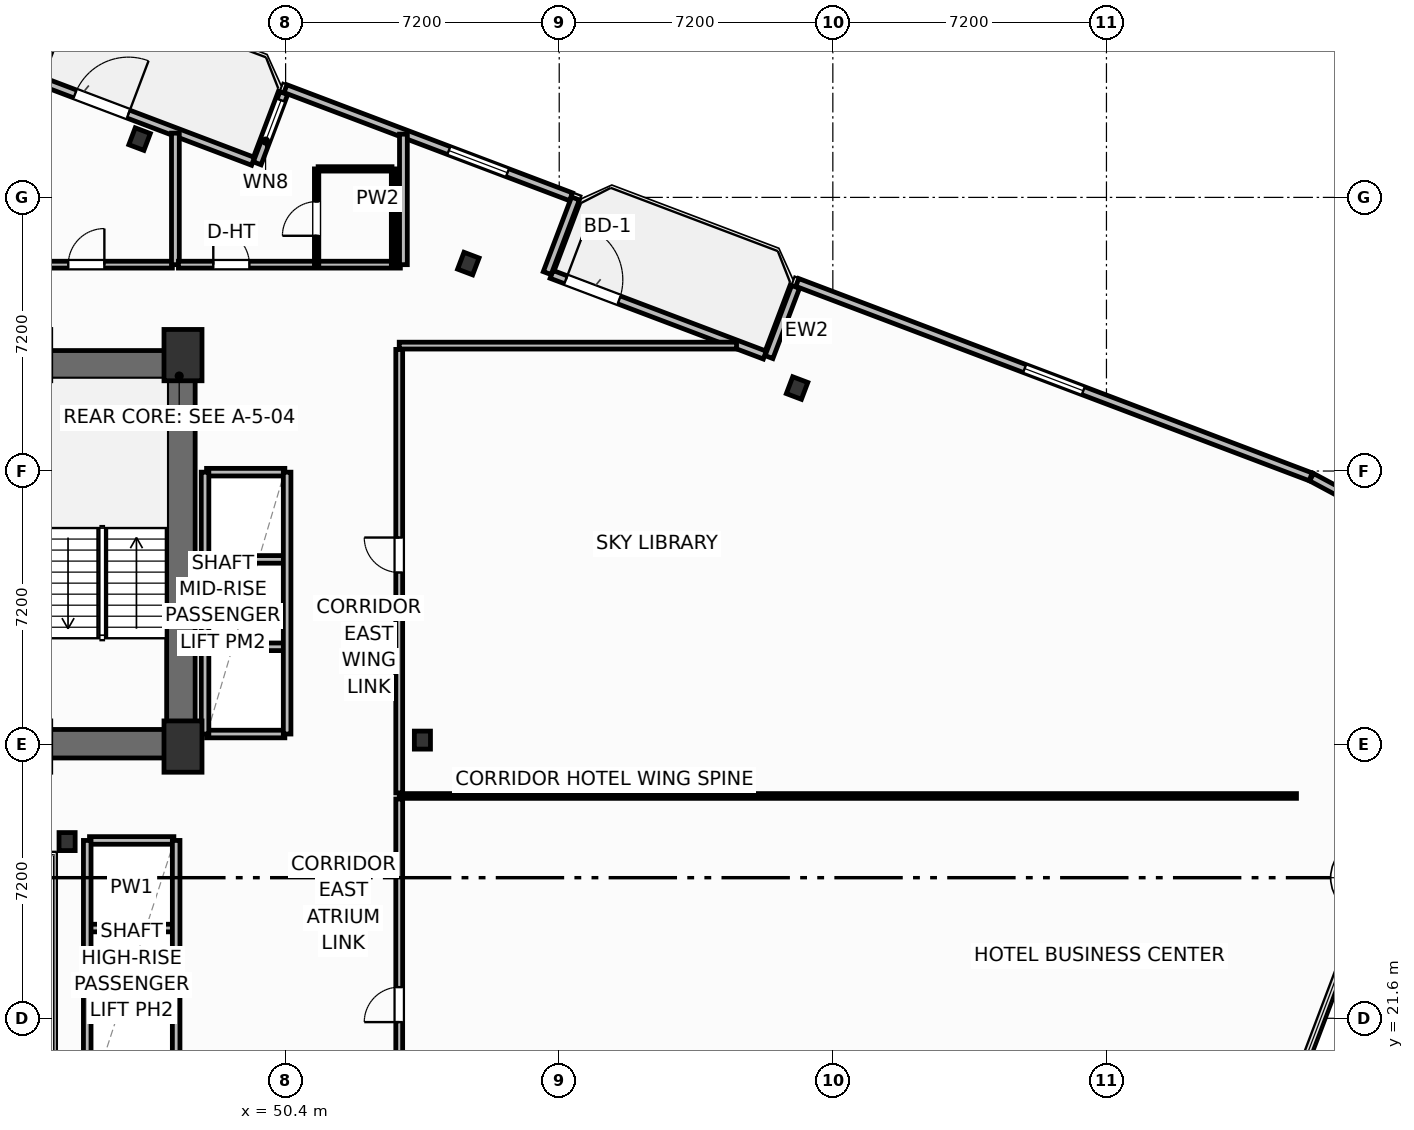
"""IFC4 building model, lengths in metres.
Left out: names, types, materials, properties, quantities, classifications, styles, units other than length and angle.
Written with IfcOpenShell. Run it as: python <this file> out.ifc"""

import sys

from ifc_helpers import new_model, si_unit, direction, frame, frame_2d, origin, origin_2d, place, context, subcontext, project, spatial, rectangle, i_section, extrude, element, fill, save


model = new_model("IFC4")
c1 = context("Model", 3, precision=1e-05, world=origin(), true_north=direction((0.0, 1.0)))
c2 = subcontext(c1, "Body", "Model", "MODEL_VIEW")
j1 = project(units=[si_unit("LENGTHUNIT", "METRE"), si_unit("PLANEANGLEUNIT", "RADIAN")], contexts=[c1])
p1 = place(None, origin())
s1 = spatial("IfcSite", under=j1, at=p1, CompositionType="ELEMENT")
p2 = place(p1, origin())
s2 = spatial("IfcBuilding", under=s1, at=p2, CompositionType="ELEMENT")
p3 = place(p2, frame((0.0, 0.0, 87.3)))
s3 = spatial("IfcBuildingStorey", under=s2, at=p3, CompositionType="ELEMENT", Elevation=87.3)
for number, where, z_axis, x_axis in (
    (1, (47.7, 28.75, 0.0), (0.0, 0.0, 1.0), (1.0, 0.0, 0.0)),
    (2, (47.7, 39.05, 0.0), (0.0, 0.0, 1.0), (1.0, 0.0, 0.0)),
):
    element("IfcColumn", number, at=place(p3, frame(where, z_axis=z_axis, x_axis=x_axis)), inside=s3, PredefinedType="COLUMN", context=c2, shape_type="SweptSolid", body=[
        extrude(rectangle(XDim=1.0, YDim=1.35, at=origin_2d()), origin(), (0.0, 0.0, 1.0), 3.7),
    ])
for number, where, z_axis, x_axis in (
    (3, (44.65, 26.25, 0.0), (0.0, 0.0, 1.0), (1.0, 0.0, 0.0)),
    (4, (54.0, 28.92, 0.0), (0.0, 0.0, 1.0), (1.0, 0.0, 0.0)),
):
    element("IfcColumn", number, at=place(p3, frame(where, z_axis=z_axis, x_axis=x_axis)), inside=s3, PredefinedType="COLUMN", context=c2, shape_type="SweptSolid", body=[
        extrude(i_section(OverallWidth=0.424, OverallDepth=0.474, WebThickness=0.048, FlangeThickness=0.077, FilletRadius=0.025, at=origin_2d()), origin(), (0.0, 0.0, 1.0), 3.7),
    ])
p4 = place(p3, frame((30.38, 38.795, 0.0), z_axis=(0.0, 0.0, 1.0), x_axis=(1.0, 0.0, 0.0)))
e5 = element("IfcWall", 5, at=p4, inside=s3, PredefinedType="SHEAR", context=c2, shape_type="SweptSolid", body=[
    extrude(rectangle(XDim=17.64, YDim=0.75, at=frame_2d((8.82, 0.0))), origin(), (0.0, 0.0, 1.0), 3.45),
])
p5 = place(p3, frame((47.645, 29.2, 0.0), z_axis=(0.0, 0.0, 1.0), x_axis=(0.0, 1.0, 0.0)))
e6 = element("IfcWall", 6, at=p5, inside=s3, PredefinedType="SHEAR", context=c2, shape_type="SweptSolid", body=[
    extrude(rectangle(XDim=9.22, YDim=0.75, at=frame_2d((4.61, 0.0))), origin(), (0.0, 0.0, 1.0), 3.45),
])
p6 = place(p3, frame((43.6, 28.825, 0.0), z_axis=(0.0, 0.0, 1.0), x_axis=(1.0, 0.0, 0.0)))
e7 = element("IfcWall", 7, at=p6, inside=s3, PredefinedType="SHEAR", context=c2, shape_type="SweptSolid", body=[
    extrude(rectangle(XDim=4.42, YDim=0.75, at=frame_2d((2.21, 0.0))), origin(), (0.0, 0.0, 1.0), 3.45),
])
for number, where, z_axis, x_axis in (
    (8, (63.859, 38.184, 0.0), (0.0, 0.0, 1.0), (0.935, -0.354, 0.0)),
    (9, (55.208, 41.459, 0.0), (0.0, 0.0, 1.0), (0.935, -0.354, 0.0)),
    (10, (46.557, 44.734, 0.0), (0.0, 0.0, 1.0), (0.935, -0.354, 0.0)),
):
    element("IfcColumn", number, at=place(p3, frame(where, z_axis=z_axis, x_axis=x_axis)), inside=s3, PredefinedType="COLUMN", context=c2, shape_type="SweptSolid", body=[
        extrude(i_section(OverallWidth=0.424, OverallDepth=0.474, WebThickness=0.048, FlangeThickness=0.077, FilletRadius=0.025, at=origin_2d()), origin(), (0.0, 0.0, 1.0), 3.7),
    ])
p7 = place(p3, frame((43.932, 46.273, 0.0), z_axis=(0.0, 0.0, 1.0), x_axis=(0.93521416643, -0.354082565101, 0.0)))
e11 = element("IfcWall", 11, at=p7, inside=s3, PredefinedType="SOLIDWALL", context=c2, shape_type="SweptSolid", body=[
    extrude(rectangle(XDim=6.0, YDim=0.22, at=frame_2d((3.0, 0.0))), origin(), (0.0, 0.0, 1.0), 2.73),
])
p8 = place(p7, frame((0.992, 0.0, 0.0)))
e12 = element("IfcOpeningElement", 12, at=p8, cuts=e11, PredefinedType="OPENING", context=c2, shape_type="SweptSolid", body=[
    extrude(rectangle(XDim=1.5, YDim=2.25, at=frame_2d((0.75, 1.125))), frame((0.0, 0.12, 0.0), z_axis=(0.0, -1.0, 0.0), x_axis=(1.0, 0.0, 0.0)), (0.0, 0.0, 1.0), 0.24),
])
p9 = place(p3, frame((57.399, 41.175, 0.0), z_axis=(0.0, 0.0, 1.0), x_axis=(0.935227640088, -0.354046976001, 0.0)))
e13 = element("IfcWall", 13, at=p9, inside=s3, PredefinedType="SOLIDWALL", context=c2, shape_type="SweptSolid", body=[
    extrude(rectangle(XDim=6.0, YDim=0.22, at=frame_2d((3.0, 0.0))), origin(), (0.0, 0.0, 1.0), 2.73),
])
p10 = place(p9, frame((0.4, 0.0, 0.0)))
e14 = element("IfcOpeningElement", 14, at=p10, cuts=e13, PredefinedType="OPENING", context=c2, shape_type="SweptSolid", body=[
    extrude(rectangle(XDim=1.5, YDim=2.25, at=frame_2d((0.75, 1.125))), frame((0.0, 0.12, 0.0), z_axis=(0.0, -1.0, 0.0), x_axis=(1.0, 0.0, 0.0)), (0.0, 0.0, 1.0), 0.24),
])
p11 = place(p3, frame((78.597, 35.194, 0.0), z_axis=(0.0, 0.0, 1.0), x_axis=(-0.880948732004, 0.473211719614, 0.0)))
e15 = element("IfcWall", 15, at=p11, inside=s3, PredefinedType="SOLIDWALL", context=c2, shape_type="SweptSolid", body=[
    extrude(rectangle(XDim=1.361, YDim=0.22, at=frame_2d((0.681, 0.0))), origin(), (0.0, 0.0, 1.0), 2.73),
])
p12 = place(p3, frame((77.375, 35.847, 0.0), z_axis=(0.0, 0.0, 1.0), x_axis=(-0.935222448475, 0.354060689526, 0.0)))
e16 = element("IfcWall", 16, at=p12, inside=s3, PredefinedType="SOLIDWALL", context=c2, shape_type="SweptSolid", body=[
    extrude(rectangle(XDim=14.447, YDim=0.22, at=frame_2d((7.224, 0.0))), origin(), (0.0, 0.0, 1.0), 2.73),
])
p13 = place(p12, frame((6.399, 0.0, 0.8)))
e17 = element("IfcOpeningElement", 17, at=p13, cuts=e16, PredefinedType="OPENING", context=c2, shape_type="SweptSolid", body=[
    extrude(rectangle(XDim=1.65, YDim=1.65, at=frame_2d((0.825, 0.825))), frame((0.0, 0.12, 0.0), z_axis=(0.0, -1.0, 0.0), x_axis=(1.0, 0.0, 0.0)), (0.0, 0.0, 1.0), 0.24),
])
p14 = place(p3, frame((63.819, 40.845, 0.0), z_axis=(0.0, 0.0, 1.0), x_axis=(-0.354128791944, -0.935196663123, 0.0)))
e18 = element("IfcWall", 18, at=p14, inside=s3, PredefinedType="SOLIDWALL", context=c2, shape_type="SweptSolid", body=[
    extrude(rectangle(XDim=1.975, YDim=0.22, at=frame_2d((0.988, 0.0))), origin(), (0.0, 0.0, 1.0), 2.73),
])
p15 = place(p3, frame((57.284, 41.208, 0.0), z_axis=(0.0, 0.0, 1.0), x_axis=(0.354128469405, 0.935196785258, 0.0)))
e19 = element("IfcWall", 19, at=p15, inside=s3, PredefinedType="SOLIDWALL", context=c2, shape_type="SweptSolid", body=[
    extrude(rectangle(XDim=2.1, YDim=0.22, at=frame_2d((1.05, 0.0))), origin(), (0.0, 0.0, 1.0), 2.73),
])
p16 = place(p3, frame((57.91, 43.216, 0.0), z_axis=(0.0, 0.0, 1.0), x_axis=(-0.935220736163, 0.354065212427, 0.0)))
e20 = element("IfcWall", 20, at=p16, inside=s3, PredefinedType="SOLIDWALL", context=c2, shape_type="SweptSolid", body=[
    extrude(rectangle(XDim=8.035, YDim=0.22, at=frame_2d((4.018, 0.0))), origin(), (0.0, 0.0, 1.0), 2.73),
])
p17 = place(p16, frame((1.788, 0.0, 0.8)))
e21 = element("IfcOpeningElement", 21, at=p17, cuts=e20, PredefinedType="OPENING", context=c2, shape_type="SweptSolid", body=[
    extrude(rectangle(XDim=1.65, YDim=1.65, at=frame_2d((0.825, 0.825))), frame((0.0, 0.12, 0.0), z_axis=(0.0, -1.0, 0.0), x_axis=(1.0, 0.0, 0.0)), (0.0, 0.0, 1.0), 0.24),
])
p18 = place(p3, frame((50.352, 45.944, 0.0), z_axis=(0.0, 0.0, 1.0), x_axis=(-0.354061611705, -0.935222099352, 0.0)))
e22 = element("IfcWall", 22, at=p18, inside=s3, PredefinedType="SOLIDWALL", context=c2, shape_type="SweptSolid", body=[
    extrude(rectangle(XDim=1.975, YDim=0.22, at=frame_2d((0.987, 0.0))), origin(), (0.0, 0.0, 1.0), 2.73),
])
p19 = place(p18, frame((0.2, 0.0, 0.8)))
e23 = element("IfcOpeningElement", 23, at=p19, cuts=e22, PredefinedType="OPENING", context=c2, shape_type="SweptSolid", body=[
    extrude(rectangle(XDim=1.15, YDim=1.4, at=frame_2d((0.575, 0.7))), frame((0.0, 0.12, 0.0), z_axis=(0.0, -1.0, 0.0), x_axis=(1.0, 0.0, 0.0)), (0.0, 0.0, 1.0), 0.24),
])
p20 = place(p3, frame((43.817, 46.306, 0.0), z_axis=(0.0, 0.0, 1.0), x_axis=(0.353988291547, 0.935249854022, 0.0)))
e24 = element("IfcWall", 24, at=p20, inside=s3, PredefinedType="SOLIDWALL", context=c2, shape_type="SweptSolid", body=[
    extrude(rectangle(XDim=2.1, YDim=0.22, at=frame_2d((1.05, 0.0))), origin(), (0.0, 0.0, 1.0), 2.73),
])
p21 = place(p3, frame((41.58, 41.43, 0.0), z_axis=(0.0, 0.0, 1.0), x_axis=(1.0, 0.0, 0.0)))
e25 = element("IfcWall", 25, at=p21, inside=s3, PredefinedType="PARTITIONING", context=c2, shape_type="SweptSolid", body=[
    extrude(rectangle(XDim=5.84, YDim=0.18, at=frame_2d((2.92, 0.0))), origin(), (0.0, 0.0, 1.0), 3.45),
])
p22 = place(p21, frame((3.101, 0.0, 0.0)))
e26 = element("IfcOpeningElement", 26, at=p22, cuts=e25, PredefinedType="OPENING", context=c2, shape_type="SweptSolid", body=[
    extrude(rectangle(XDim=0.95, YDim=2.15, at=frame_2d((0.475, 1.075))), frame((0.0, 0.1, 0.0), z_axis=(0.0, -1.0, 0.0), x_axis=(1.0, 0.0, 0.0)), (0.0, 0.0, 1.0), 0.2),
])
p23 = place(p3, frame((47.5, 41.43, 0.0), z_axis=(0.0, 0.0, 1.0), x_axis=(0.0, 1.0, 0.0)))
e27 = element("IfcWall", 27, at=p23, inside=s3, PredefinedType="PARTITIONING", context=c2, shape_type="SweptSolid", body=[
    extrude(rectangle(XDim=3.46, YDim=0.205, at=frame_2d((1.73, 0.0))), origin(), (0.0, 0.0, 1.0), 3.45),
])
p24 = place(p3, frame((47.58, 41.43, 0.0), z_axis=(0.0, 0.0, 1.0), x_axis=(1.0, 0.0, 0.0)))
e28 = element("IfcWall", 28, at=p24, inside=s3, PredefinedType="PARTITIONING", context=c2, shape_type="SweptSolid", body=[
    extrude(rectangle(XDim=5.84, YDim=0.18, at=frame_2d((2.92, 0.0))), origin(), (0.0, 0.0, 1.0), 3.45),
])
p25 = place(p24, frame((0.917, 0.0, 0.0)))
e29 = element("IfcOpeningElement", 29, at=p25, cuts=e28, PredefinedType="OPENING", context=c2, shape_type="SweptSolid", body=[
    extrude(rectangle(XDim=0.95, YDim=2.15, at=frame_2d((0.475, 1.075))), frame((0.0, 0.1, 0.0), z_axis=(0.0, -1.0, 0.0), x_axis=(1.0, 0.0, 0.0)), (0.0, 0.0, 1.0), 0.2),
])
p26 = place(p3, frame((51.256, 43.95, 0.0), z_axis=(0.0, 0.0, 1.0), x_axis=(1.0, 0.0, 0.0)))
e30 = element("IfcWall", 30, at=p26, inside=s3, PredefinedType="PARTITIONING", context=c2, shape_type="SweptSolid", body=[
    extrude(rectangle(XDim=1.944, YDim=0.115, at=frame_2d((0.972, 0.0))), origin(), (0.0, 0.0, 1.0), 3.45),
])
p27 = place(p3, frame((51.216, 41.43, 0.0), z_axis=(0.0, 0.0, 1.0), x_axis=(0.0, 1.0, 0.0)))
e31 = element("IfcWall", 31, at=p27, inside=s3, PredefinedType="PARTITIONING", context=c2, shape_type="SweptSolid", body=[
    extrude(rectangle(XDim=2.52, YDim=0.115, at=frame_2d((1.26, 0.0))), origin(), (0.0, 0.0, 1.0), 3.45),
])
p28 = place(p27, frame((0.76, 0.0, 0.0)))
e32 = element("IfcOpeningElement", 32, at=p28, cuts=e31, PredefinedType="OPENING", context=c2, shape_type="SweptSolid", body=[
    extrude(rectangle(XDim=0.9, YDim=2.05, at=frame_2d((0.45, 1.025))), frame((0.0, 0.067, 0.0), z_axis=(0.0, -1.0, 0.0), x_axis=(1.0, 0.0, 0.0)), (0.0, 0.0, 1.0), 0.135),
])
p29 = place(p3, frame((53.24, 41.43, 0.0), z_axis=(0.0, 0.0, 1.0), x_axis=(0.0, 1.0, 0.0)))
e33 = element("IfcWall", 33, at=p29, inside=s3, PredefinedType="PARTITIONING", context=c2, shape_type="SweptSolid", body=[
    extrude(rectangle(XDim=2.52, YDim=0.115, at=frame_2d((1.26, 0.0))), origin(), (0.0, 0.0, 1.0), 3.45),
])
p30 = place(p3, frame((53.5, 41.43, 0.0), z_axis=(0.0, 0.0, 1.0), x_axis=(0.0, 1.0, 0.0)))
e34 = element("IfcWall", 34, at=p30, inside=s3, PredefinedType="PARTITIONING", context=c2, shape_type="SweptSolid", body=[
    extrude(rectangle(XDim=3.434, YDim=0.205, at=frame_2d((1.717, 0.0))), origin(), (0.0, 0.0, 1.0), 3.45),
])
p31 = place(p3, frame((53.39, 19.3, 0.0), z_axis=(0.0, 0.0, 1.0), x_axis=(0.0, 1.0, 0.0)))
e35 = element("IfcWall", 35, at=p31, inside=s3, PredefinedType="PARTITIONING", context=c2, shape_type="SweptSolid", body=[
    extrude(rectangle(XDim=8.07, YDim=0.18, at=frame_2d((4.035, 0.0))), origin(), (0.0, 0.0, 1.0), 3.45),
])
p32 = place(p31, frame((2.2, 0.0, 0.0)))
e36 = element("IfcOpeningElement", 36, at=p32, cuts=e35, PredefinedType="OPENING", context=c2, shape_type="SweptSolid", body=[
    extrude(rectangle(XDim=0.92, YDim=2.05, at=frame_2d((0.46, 1.025))), frame((0.0, 0.1, 0.0), z_axis=(0.0, -1.0, 0.0), x_axis=(1.0, 0.0, 0.0)), (0.0, 0.0, 1.0), 0.2),
])
p33 = place(p3, frame((53.39, 27.53, 0.0), z_axis=(0.0, 0.0, 1.0), x_axis=(0.0, 1.0, 0.0)))
e37 = element("IfcWall", 37, at=p33, inside=s3, PredefinedType="PARTITIONING", context=c2, shape_type="SweptSolid", body=[
    extrude(rectangle(XDim=11.67, YDim=0.18, at=frame_2d((5.835, 0.0))), origin(), (0.0, 0.0, 1.0), 3.45),
])
p34 = place(p33, frame((5.8, 0.0, 0.0)))
e38 = element("IfcOpeningElement", 38, at=p34, cuts=e37, PredefinedType="OPENING", context=c2, shape_type="SweptSolid", body=[
    extrude(rectangle(XDim=0.92, YDim=2.05, at=frame_2d((0.46, 1.025))), frame((0.0, 0.1, 0.0), z_axis=(0.0, -1.0, 0.0), x_axis=(1.0, 0.0, 0.0)), (0.0, 0.0, 1.0), 0.2),
])
p35 = place(p3, frame((53.39, 27.45, 0.0), z_axis=(0.0, 0.0, 1.0), x_axis=(1.0, 0.0, 0.0)))
e39 = element("IfcWall", 39, at=p35, inside=s3, PredefinedType="PARTITIONING", context=c2, shape_type="SweptSolid", body=[
    extrude(rectangle(XDim=23.61, YDim=0.125, at=frame_2d((11.805, 0.0))), origin(), (0.0, 0.0, 1.0), 3.45),
])
p36 = place(p3, frame((53.39, 39.3, 0.0), z_axis=(0.0, 0.0, 1.0), x_axis=(1.0, 0.0, 0.0)))
e40 = element("IfcWall", 40, at=p36, inside=s3, PredefinedType="PARTITIONING", context=c2, shape_type="SweptSolid", body=[
    extrude(rectangle(XDim=8.876, YDim=0.18, at=frame_2d((4.438, 0.0))), origin(), (0.0, 0.0, 1.0), 3.45),
])
for number, where, z_axis, x_axis in (
    (41, (48.32, 31.375, 0.0), (0.0, 0.0, 1.0), (1.0, 0.0, 0.0)),
    (42, (48.32, 33.675, 0.0), (0.0, 0.0, 1.0), (1.0, 0.0, 0.0)),
):
    element("IfcWall", number, at=place(p3, frame(where, z_axis=z_axis, x_axis=x_axis)), inside=s3, PredefinedType="PARTITIONING", context=c2, shape_type="SweptSolid", body=[
        extrude(rectangle(XDim=2.06, YDim=0.2, at=frame_2d((1.03, 0.0))), origin(), (0.0, 0.0, 1.0), 3.45),
    ])
p37 = place(p3, frame((48.32, 29.08, 0.0), z_axis=(0.0, 0.0, 1.0), x_axis=(1.0, 0.0, 0.0)))
e43 = element("IfcWall", 43, at=p37, inside=s3, PredefinedType="PARTITIONING", context=c2, shape_type="SweptSolid", body=[
    extrude(rectangle(XDim=2.06, YDim=0.2, at=frame_2d((1.03, 0.0))), origin(), (0.0, 0.0, 1.0), 2.662),
])
p38 = place(p3, frame((48.32, 35.97, 0.0), z_axis=(0.0, 0.0, 1.0), x_axis=(1.0, 0.0, 0.0)))
e44 = element("IfcWall", 44, at=p38, inside=s3, PredefinedType="PARTITIONING", context=c2, shape_type="SweptSolid", body=[
    extrude(rectangle(XDim=2.06, YDim=0.2, at=frame_2d((1.03, 0.0))), origin(), (0.0, 0.0, 1.0), 3.45),
])
for number, where, z_axis, x_axis in (
    (45, (48.28, 29.08, 0.0), (0.0, 0.0, 1.0), (0.0, 1.0, 0.0)),
    (46, (50.44, 29.08, 0.0), (0.0, 0.0, 1.0), (0.0, 1.0, 0.0)),
):
    element("IfcWall", number, at=place(p3, frame(where, z_axis=z_axis, x_axis=x_axis)), inside=s3, PredefinedType="PARTITIONING", context=c2, shape_type="SweptSolid", body=[
        extrude(rectangle(XDim=6.89, YDim=0.2, at=frame_2d((3.445, 0.0))), origin(), (0.0, 0.0, 1.0), 3.45),
    ])
for number, where, z_axis, x_axis in (
    (47, (45.24, 21.675, 0.0), (0.0, 0.0, 1.0), (1.0, 0.0, 0.0)),
    (48, (45.24, 23.975, 0.0), (0.0, 0.0, 1.0), (1.0, 0.0, 0.0)),
    (49, (45.24, 26.28, 0.0), (0.0, 0.0, 1.0), (1.0, 0.0, 0.0)),
):
    element("IfcWall", number, at=place(p3, frame(where, z_axis=z_axis, x_axis=x_axis)), inside=s3, PredefinedType="PARTITIONING", context=c2, shape_type="SweptSolid", body=[
        extrude(rectangle(XDim=2.22, YDim=0.2, at=frame_2d((1.11, 0.0))), origin(), (0.0, 0.0, 1.0), 3.45),
    ])
for number, where, z_axis, x_axis in (
    (50, (45.18, 19.38, 0.0), (0.0, 0.0, 1.0), (0.0, 1.0, 0.0)),
    (51, (47.52, 19.38, 0.0), (0.0, 0.0, 1.0), (0.0, 1.0, 0.0)),
):
    element("IfcWall", number, at=place(p3, frame(where, z_axis=z_axis, x_axis=x_axis)), inside=s3, PredefinedType="PARTITIONING", context=c2, shape_type="SweptSolid", body=[
        extrude(rectangle(XDim=6.9, YDim=0.2, at=frame_2d((3.45, 0.0))), origin(), (0.0, 0.0, 1.0), 3.45),
    ])
p39 = place(p8, origin())
e52 = element("IfcDoor", 52, at=p39, inside=s3, OperationType="SINGLE_SWING_RIGHT", PredefinedType="DOOR", context=c2, shape_type="SweptSolid", body=[
    extrude(rectangle(XDim=1.5, YDim=2.25, at=frame_2d((0.75, 1.125))), frame((0.0, 0.025, 0.0), z_axis=(0.0, -1.0, 0.0), x_axis=(1.0, 0.0, 0.0)), (0.0, 0.0, 1.0), 0.05),
])
fill(e12, e52)
p40 = place(p10, origin())
e53 = element("IfcDoor", 53, at=p40, inside=s3, OperationType="SINGLE_SWING_LEFT", PredefinedType="DOOR", context=c2, shape_type="SweptSolid", body=[
    extrude(rectangle(XDim=1.5, YDim=2.25, at=frame_2d((0.75, 1.125))), frame((0.0, 0.025, 0.0), z_axis=(0.0, -1.0, 0.0), x_axis=(1.0, 0.0, 0.0)), (0.0, 0.0, 1.0), 0.05),
])
fill(e14, e53)
p41 = place(p13, origin())
e54 = element("IfcWindow", 54, at=p41, inside=s3, PartitioningType="SINGLE_PANEL", PredefinedType="WINDOW", context=c2, shape_type="SweptSolid", body=[
    extrude(rectangle(XDim=1.65, YDim=1.65, at=frame_2d((0.825, 0.825))), frame((0.0, 0.03, 0.0), z_axis=(0.0, -1.0, 0.0), x_axis=(1.0, 0.0, 0.0)), (0.0, 0.0, 1.0), 0.06),
])
fill(e17, e54)
p42 = place(p17, origin())
e55 = element("IfcWindow", 55, at=p42, inside=s3, PartitioningType="SINGLE_PANEL", PredefinedType="WINDOW", context=c2, shape_type="SweptSolid", body=[
    extrude(rectangle(XDim=1.65, YDim=1.65, at=frame_2d((0.825, 0.825))), frame((0.0, 0.03, 0.0), z_axis=(0.0, -1.0, 0.0), x_axis=(1.0, 0.0, 0.0)), (0.0, 0.0, 1.0), 0.06),
])
fill(e21, e55)
p43 = place(p22, origin())
e56 = element("IfcDoor", 56, at=p43, inside=s3, OperationType="SINGLE_SWING_RIGHT", PredefinedType="DOOR", context=c2, shape_type="SweptSolid", body=[
    extrude(rectangle(XDim=0.95, YDim=2.15, at=frame_2d((0.475, 1.075))), frame((0.0, 0.025, 0.0), z_axis=(0.0, -1.0, 0.0), x_axis=(1.0, 0.0, 0.0)), (0.0, 0.0, 1.0), 0.05),
])
fill(e26, e56)
p44 = place(p25, origin())
e57 = element("IfcDoor", 57, at=p44, inside=s3, OperationType="SINGLE_SWING_LEFT", PredefinedType="DOOR", context=c2, shape_type="SweptSolid", body=[
    extrude(rectangle(XDim=0.95, YDim=2.15, at=frame_2d((0.475, 1.075))), frame((0.0, 0.025, 0.0), z_axis=(0.0, -1.0, 0.0), x_axis=(1.0, 0.0, 0.0)), (0.0, 0.0, 1.0), 0.05),
])
fill(e29, e57)
p45 = place(p28, origin())
e58 = element("IfcDoor", 58, at=p45, inside=s3, OperationType="SINGLE_SWING_LEFT", PredefinedType="DOOR", context=c2, shape_type="SweptSolid", body=[
    extrude(rectangle(XDim=0.9, YDim=2.05, at=frame_2d((0.45, 1.025))), frame((0.0, 0.025, 0.0), z_axis=(0.0, -1.0, 0.0), x_axis=(1.0, 0.0, 0.0)), (0.0, 0.0, 1.0), 0.05),
])
fill(e32, e58)
p46 = place(p32, origin())
e59 = element("IfcDoor", 59, at=p46, inside=s3, OperationType="SINGLE_SWING_LEFT", PredefinedType="DOOR", context=c2, shape_type="SweptSolid", body=[
    extrude(rectangle(XDim=0.92, YDim=2.05, at=frame_2d((0.46, 1.025))), frame((0.0, 0.025, 0.0), z_axis=(0.0, -1.0, 0.0), x_axis=(1.0, 0.0, 0.0)), (0.0, 0.0, 1.0), 0.05),
])
fill(e36, e59)
p47 = place(p34, origin())
e60 = element("IfcDoor", 60, at=p47, inside=s3, OperationType="SINGLE_SWING_RIGHT", PredefinedType="DOOR", context=c2, shape_type="SweptSolid", body=[
    extrude(rectangle(XDim=0.92, YDim=2.05, at=frame_2d((0.46, 1.025))), frame((0.0, 0.025, 0.0), z_axis=(0.0, -1.0, 0.0), x_axis=(1.0, 0.0, 0.0)), (0.0, 0.0, 1.0), 0.05),
])
fill(e38, e60)
p48 = place(p19, origin())
e61 = element("IfcWindow", 61, at=p48, inside=s3, PartitioningType="SINGLE_PANEL", PredefinedType="WINDOW", context=c2, shape_type="SweptSolid", body=[
    extrude(rectangle(XDim=1.15, YDim=1.4, at=frame_2d((0.575, 0.7))), frame((0.0, 0.03, 0.0), z_axis=(0.0, -1.0, 0.0), x_axis=(1.0, 0.0, 0.0)), (0.0, 0.0, 1.0), 0.06),
])
fill(e23, e61)
save(model, sys.argv[1])
